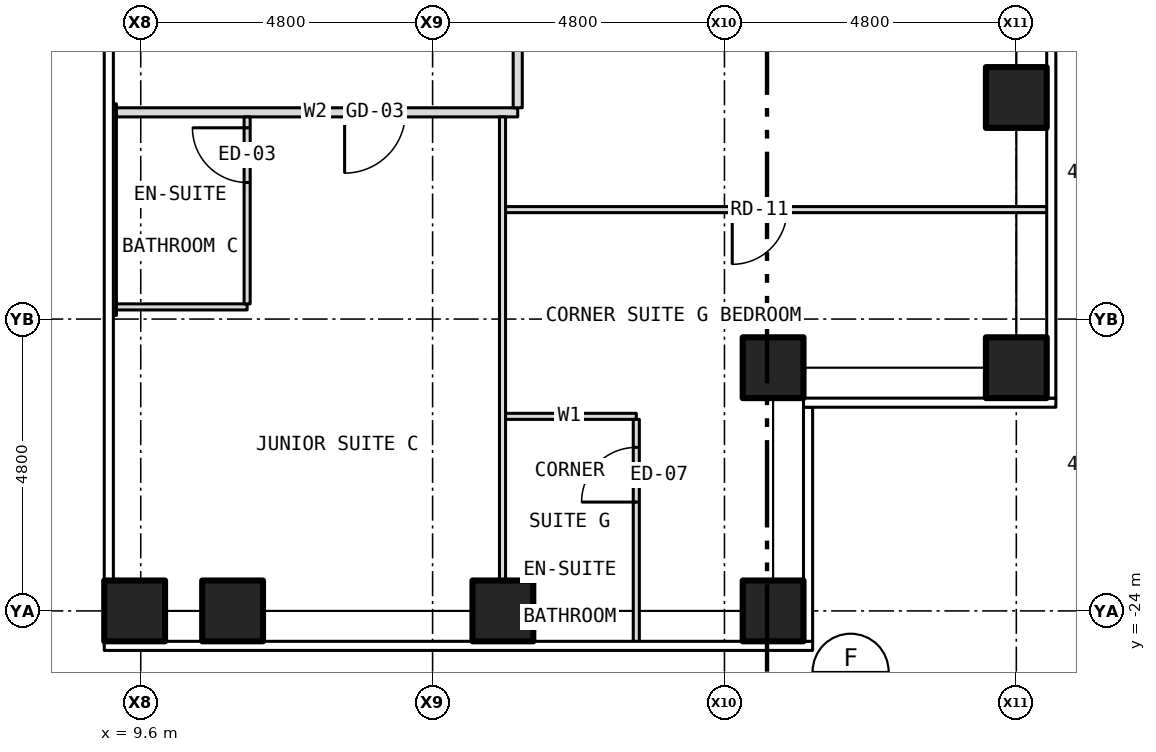
"""IFC4 building model, lengths in metres.
Left out: names, types, materials, properties, quantities, classifications, styles, units other than length and angle.
Written with IfcOpenShell. Run it as: python <this file> out.ifc"""

import sys

from ifc_helpers import new_model, si_unit, direction, frame, frame_2d, origin, origin_2d, place, context, subcontext, project, spatial, rectangle, hollow_rectangle, extrude, element, fill, save


model = new_model("IFC4")
c1 = context("Model", 3, precision=1e-05, world=origin(), true_north=direction((0.0, 1.0)))
c2 = subcontext(c1, "Body", "Model", "MODEL_VIEW")
j1 = project(units=[si_unit("LENGTHUNIT", "METRE"), si_unit("PLANEANGLEUNIT", "RADIAN")], contexts=[c1])
p1 = place(None, origin())
s1 = spatial("IfcSite", under=j1, at=p1, CompositionType="ELEMENT")
p2 = place(p1, origin())
s2 = spatial("IfcBuilding", under=s1, at=p2, CompositionType="ELEMENT")
p3 = place(p2, frame((0.0, 0.0, 74.0)))
s3 = spatial("IfcBuildingStorey", under=s2, at=p3, CompositionType="ELEMENT", Elevation=74.0)
for number, where, z_axis, x_axis in (
    (1, (11.111, -24.0, -0.15), (0.0, 0.0, 1.0), (1.0, 0.0, 0.0)),
    (2, (15.556, -24.0, -0.15), (0.0, 0.0, 1.0), (1.0, 0.0, 0.0)),
    (3, (20.0, -24.0, -0.15), (0.0, 0.0, 1.0), (1.0, 0.0, 0.0)),
    (4, (24.0, -20.0, -0.15), (0.0, 0.0, 1.0), (1.0, 0.0, 0.0)),
    (5, (24.0, -15.556, -0.15), (0.0, 0.0, 1.0), (1.0, 0.0, 0.0)),
    (6, (20.0, -20.0, -0.15), (0.0, 0.0, 1.0), (1.0, 0.0, 0.0)),
    (7, (9.5, -24.0, -0.15), (0.0, 0.0, 1.0), (1.0, 0.0, 0.0)),
):
    element("IfcColumn", number, at=place(p3, frame(where, z_axis=z_axis, x_axis=x_axis)), inside=s3, PredefinedType="COLUMN", context=c2, shape_type="SweptSolid", body=[
        extrude(hollow_rectangle(XDim=1.0, YDim=1.0, WallThickness=0.06, at=origin_2d()), origin(), (0.0, 0.0, 1.0), 3.5),
    ])
p4 = place(p3, frame((15.55, -20.8, 0.0), z_axis=(0.0, 0.0, 1.0), x_axis=(1.0, 0.0, 0.0)))
e8 = element("IfcWall", 8, at=p4, inside=s3, PredefinedType="PARTITIONING", context=c2, shape_type="SweptSolid", body=[
    extrude(rectangle(XDim=2.2, YDim=0.1, at=frame_2d((1.1, 0.0))), origin(), (0.0, 0.0, 1.0), 3.35),
])
p5 = place(p3, frame((9.15, -19.0, 0.0), z_axis=(0.0, 0.0, 1.0), x_axis=(1.0, 0.0, 0.0)))
e9 = element("IfcWall", 9, at=p5, inside=s3, PredefinedType="PARTITIONING", context=c2, shape_type="SweptSolid", body=[
    extrude(rectangle(XDim=2.2, YDim=0.1, at=frame_2d((1.1, 0.0))), origin(), (0.0, 0.0, 1.0), 3.35),
])
p6 = place(p3, frame((15.55, -17.4, 0.0), z_axis=(0.0, 0.0, 1.0), x_axis=(1.0, 0.0, 0.0)))
e10 = element("IfcWall", 10, at=p6, inside=s3, PredefinedType="PARTITIONING", context=c2, shape_type="SweptSolid", body=[
    extrude(rectangle(XDim=8.98, YDim=0.1, at=frame_2d((4.49, 0.0))), origin(), (0.0, 0.0, 1.0), 3.35),
])
p7 = place(p6, frame((3.778, 0.0, 0.0)))
e11 = element("IfcOpeningElement", 11, at=p7, cuts=e10, PredefinedType="OPENING", context=c2, shape_type="SweptSolid", body=[
    extrude(rectangle(XDim=0.9, YDim=2.1, at=frame_2d((0.45, 1.05))), frame((0.0, 0.062, 0.0), z_axis=(0.0, -1.0, 0.0), x_axis=(1.0, 0.0, 0.0)), (0.0, 0.0, 1.0), 0.124),
])
p8 = place(p3, frame((9.15, -15.8, 0.0), z_axis=(0.0, 0.0, 1.0), x_axis=(1.0, 0.0, 0.0)))
e12 = element("IfcWall", 12, at=p8, inside=s3, PredefinedType="PARTITIONING", context=c2, shape_type="SweptSolid", body=[
    extrude(rectangle(XDim=6.65, YDim=0.15, at=frame_2d((3.325, 0.0))), origin(), (0.0, 0.0, 1.0), 3.35),
])
p9 = place(p8, frame((3.803, 0.0, 0.0)))
e13 = element("IfcOpeningElement", 13, at=p9, cuts=e12, PredefinedType="OPENING", context=c2, shape_type="SweptSolid", body=[
    extrude(rectangle(XDim=1.0, YDim=2.1, at=frame_2d((0.5, 1.05))), frame((0.0, 0.087, 0.0), z_axis=(0.0, -1.0, 0.0), x_axis=(1.0, 0.0, 0.0)), (0.0, 0.0, 1.0), 0.174),
])
p10 = place(p3, frame((9.15, -19.14, 0.0), z_axis=(0.0, 0.0, 1.0), x_axis=(0.0, 1.0, 0.0)))
e14 = element("IfcWall", 14, at=p10, inside=s3, PredefinedType="PARTITIONING", context=c2, shape_type="SweptSolid", body=[
    extrude(rectangle(XDim=3.48, YDim=0.1, at=frame_2d((1.74, 0.0))), origin(), (0.0, 0.0, 1.0), 2.733),
])
p11 = place(p3, frame((11.35, -18.95, 0.0), z_axis=(0.0, 0.0, 1.0), x_axis=(0.0, 1.0, 0.0)))
e15 = element("IfcWall", 15, at=p11, inside=s3, PredefinedType="PARTITIONING", context=c2, shape_type="SweptSolid", body=[
    extrude(rectangle(XDim=3.075, YDim=0.1, at=frame_2d((1.538, 0.0))), origin(), (0.0, 0.0, 1.0), 3.35),
])
p12 = place(p11, frame((1.996, 0.0, 0.0)))
e16 = element("IfcOpeningElement", 16, at=p12, cuts=e15, PredefinedType="OPENING", context=c2, shape_type="SweptSolid", body=[
    extrude(rectangle(XDim=0.9, YDim=2.1, at=frame_2d((0.45, 1.05))), frame((0.0, 0.062, 0.0), z_axis=(0.0, -1.0, 0.0), x_axis=(1.0, 0.0, 0.0)), (0.0, 0.0, 1.0), 0.124),
])
p13 = place(p3, frame((15.55, -23.88, 0.0), z_axis=(0.0, 0.0, 1.0), x_axis=(0.0, 1.0, 0.0)))
e17 = element("IfcWall", 17, at=p13, inside=s3, PredefinedType="PARTITIONING", context=c2, shape_type="SweptSolid", body=[
    extrude(rectangle(XDim=8.005, YDim=0.1, at=frame_2d((4.002, 0.0))), origin(), (0.0, 0.0, 1.0), 3.35),
])
p14 = place(p3, frame((15.8, -15.725, 0.0), z_axis=(0.0, 0.0, 1.0), x_axis=(0.0, 1.0, 0.0)))
e18 = element("IfcWall", 18, at=p14, inside=s3, PredefinedType="PARTITIONING", context=c2, shape_type="SweptSolid", body=[
    extrude(rectangle(XDim=4.805, YDim=0.15, at=frame_2d((2.403, 0.0))), origin(), (0.0, 0.0, 1.0), 3.35),
])
p15 = place(p14, frame((3.025, 0.0, 0.0)))
e19 = element("IfcOpeningElement", 19, at=p15, cuts=e18, PredefinedType="OPENING", context=c2, shape_type="SweptSolid", body=[
    extrude(rectangle(XDim=1.0, YDim=2.1, at=frame_2d((0.5, 1.05))), frame((0.0, 0.087, 0.0), z_axis=(0.0, -1.0, 0.0), x_axis=(1.0, 0.0, 0.0)), (0.0, 0.0, 1.0), 0.174),
])
p16 = place(p3, frame((17.75, -24.53, 0.0), z_axis=(0.0, 0.0, 1.0), x_axis=(0.0, 1.0, 0.0)))
e20 = element("IfcWall", 20, at=p16, inside=s3, PredefinedType="PARTITIONING", context=c2, shape_type="SweptSolid", body=[
    extrude(rectangle(XDim=3.68, YDim=0.1, at=frame_2d((1.84, 0.0))), origin(), (0.0, 0.0, 1.0), 3.35),
])
p17 = place(p16, frame((2.32, 0.0, 0.0)))
e21 = element("IfcOpeningElement", 21, at=p17, cuts=e20, PredefinedType="OPENING", context=c2, shape_type="SweptSolid", body=[
    extrude(rectangle(XDim=0.9, YDim=2.1, at=frame_2d((0.45, 1.05))), frame((0.0, 0.062, 0.0), z_axis=(0.0, -1.0, 0.0), x_axis=(1.0, 0.0, 0.0)), (0.0, 0.0, 1.0), 0.124),
])
p18 = place(p9, origin())
e22 = element("IfcDoor", 22, at=p18, inside=s3, OperationType="SINGLE_SWING_LEFT", PredefinedType="DOOR", context=c2, shape_type="SweptSolid", body=[
    extrude(rectangle(XDim=1.0, YDim=2.1, at=frame_2d((0.5, 1.05))), frame((0.0, 0.025, 0.0), z_axis=(0.0, -1.0, 0.0), x_axis=(1.0, 0.0, 0.0)), (0.0, 0.0, 1.0), 0.05),
])
fill(e13, e22)
p19 = place(p12, origin())
e23 = element("IfcDoor", 23, at=p19, inside=s3, OperationType="SINGLE_SWING_RIGHT", PredefinedType="DOOR", context=c2, shape_type="SweptSolid", body=[
    extrude(rectangle(XDim=0.9, YDim=2.1, at=frame_2d((0.45, 1.05))), frame((0.0, 0.025, 0.0), z_axis=(0.0, -1.0, 0.0), x_axis=(1.0, 0.0, 0.0)), (0.0, 0.0, 1.0), 0.05),
])
fill(e16, e23)
p20 = place(p7, origin())
e24 = element("IfcDoor", 24, at=p20, inside=s3, OperationType="SINGLE_SWING_LEFT", PredefinedType="DOOR", context=c2, shape_type="SweptSolid", body=[
    extrude(rectangle(XDim=0.9, YDim=2.1, at=frame_2d((0.45, 1.05))), frame((0.0, 0.025, 0.0), z_axis=(0.0, -1.0, 0.0), x_axis=(1.0, 0.0, 0.0)), (0.0, 0.0, 1.0), 0.05),
])
fill(e11, e24)
p21 = place(p17, origin())
e25 = element("IfcDoor", 25, at=p21, inside=s3, OperationType="SINGLE_SWING_LEFT", PredefinedType="DOOR", context=c2, shape_type="SweptSolid", body=[
    extrude(rectangle(XDim=0.9, YDim=2.1, at=frame_2d((0.45, 1.05))), frame((0.0, 0.025, 0.0), z_axis=(0.0, -1.0, 0.0), x_axis=(1.0, 0.0, 0.0)), (0.0, 0.0, 1.0), 0.05),
])
fill(e21, e25)
save(model, sys.argv[1])
